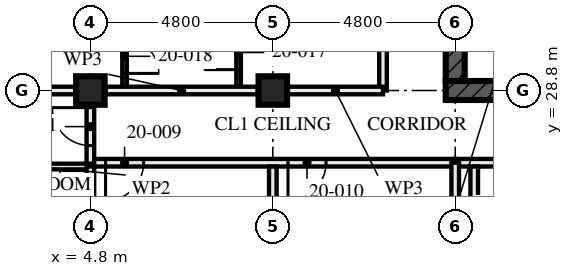
"""IFC4 building model, lengths in metres.
Left out: names, types, materials, properties, quantities, classifications, styles, units other than length and angle.
Written with IfcOpenShell. Run it as: python <this file> out.ifc"""

import sys

from ifc_helpers import new_model, si_unit, direction, frame, frame_2d, origin, origin_2d, place, context, subcontext, project, spatial, rectangle, hollow_rectangle, extrude, element, fill, save


model = new_model("IFC4")
c1 = context("Model", 3, precision=1e-05, world=origin(), true_north=direction((0.0, 1.0)))
c2 = subcontext(c1, "Body", "Model", "MODEL_VIEW")
j1 = project(units=[si_unit("LENGTHUNIT", "METRE"), si_unit("PLANEANGLEUNIT", "RADIAN")], contexts=[c1])
p1 = place(None, origin())
s1 = spatial("IfcSite", under=j1, at=p1, CompositionType="ELEMENT")
p2 = place(p1, origin())
s2 = spatial("IfcBuilding", under=s1, at=p2, CompositionType="ELEMENT")
p3 = place(p2, frame((0.0, 0.0, 76.0)))
s3 = spatial("IfcBuildingStorey", under=s2, at=p3, CompositionType="ELEMENT", Elevation=76.0)
for number, where, z_axis, x_axis in (
    (1, (4.8, 28.8, 0.0), (0.0, 0.0, 1.0), (0.0, 1.0, 0.0)),
    (2, (9.6, 28.8, 0.0), (0.0, 0.0, 1.0), (0.0, 1.0, 0.0)),
):
    element("IfcColumn", number, at=place(p3, frame(where, z_axis=z_axis, x_axis=x_axis)), inside=s3, PredefinedType="COLUMN", context=c2, shape_type="SweptSolid", body=[
        extrude(hollow_rectangle(XDim=0.75, YDim=0.75, WallThickness=0.08, at=origin_2d()), origin(), (0.0, 0.0, 1.0), 3.5),
    ])
p4 = place(p3, frame((14.15, 28.8, -0.17), z_axis=(0.0, 0.0, 1.0), x_axis=(1.0, 0.0, 0.0)))
e3 = element("IfcWall", 3, at=p4, inside=s3, PredefinedType="SHEAR", context=c2, shape_type="SweptSolid", body=[
    extrude(rectangle(XDim=14.9, YDim=0.5, at=frame_2d((7.45, 0.0))), origin(), (0.0, 0.0, 1.0), 3.42),
])
p5 = place(p4, frame((6.85, 0.0, 0.17)))
e4 = element("IfcOpeningElement", 4, at=p5, cuts=e3, PredefinedType="OPENING", context=c2, shape_type="SweptSolid", body=[
    extrude(rectangle(XDim=1.2, YDim=2.1, at=frame_2d((0.6, 1.05))), frame((0.0, 0.26, 0.0), z_axis=(0.0, -1.0, 0.0), x_axis=(1.0, 0.0, 0.0)), (0.0, 0.0, 1.0), 0.521),
])
p6 = place(p3, frame((14.4, 42.95, -0.17), z_axis=(0.0, 0.0, 1.0), x_axis=(0.0, -1.0, 0.0)))
e5 = element("IfcWall", 5, at=p6, inside=s3, PredefinedType="SHEAR", context=c2, shape_type="SweptSolid", body=[
    extrude(rectangle(XDim=13.9, YDim=0.5, at=frame_2d((6.95, 0.0))), origin(), (0.0, 0.0, 1.0), 3.42),
])
p7 = place(p6, frame((6.35, 0.0, 0.17)))
e6 = element("IfcOpeningElement", 6, at=p7, cuts=e5, PredefinedType="OPENING", context=c2, shape_type="SweptSolid", body=[
    extrude(rectangle(XDim=1.2, YDim=2.1, at=frame_2d((0.6, 1.05))), frame((0.0, 0.26, 0.0), z_axis=(0.0, -1.0, 0.0), x_axis=(1.0, 0.0, 0.0)), (0.0, 0.0, 1.0), 0.521),
])
p8 = place(p3, frame((2.0, 26.8, 0.0), z_axis=(0.0, 0.0, 1.0), x_axis=(1.0, 0.0, 0.0)))
e7 = element("IfcWall", 7, at=p8, inside=s3, PredefinedType="PARTITIONING", context=c2, shape_type="SweptSolid", body=[
    extrude(rectangle(XDim=2.8, YDim=0.15, at=frame_2d((1.4, 0.0))), origin(), (0.0, 0.0, 1.0), 3.25),
])
p9 = place(p3, frame((4.8, 19.52, 0.0), z_axis=(0.0, 0.0, 1.0), x_axis=(0.0, 1.0, 0.0)))
e8 = element("IfcWall", 8, at=p9, inside=s3, PredefinedType="PARTITIONING", context=c2, shape_type="SweptSolid", body=[
    extrude(rectangle(XDim=7.28, YDim=0.2, at=frame_2d((3.64, 0.0))), origin(), (0.0, 0.0, 1.0), 2.04),
])
p10 = place(p3, frame((9.6, 14.72, 0.0), z_axis=(0.0, 0.0, 1.0), x_axis=(0.0, 1.0, 0.0)))
e9 = element("IfcWall", 9, at=p10, inside=s3, PredefinedType="PARTITIONING", context=c2, shape_type="SweptSolid", body=[
    extrude(rectangle(XDim=12.08, YDim=0.2, at=frame_2d((6.04, 0.0))), origin(), (0.0, 0.0, 1.0), 2.04),
])
p11 = place(p3, frame((4.8, 26.9, 0.0), z_axis=(0.0, 0.0, 1.0), x_axis=(1.0, 0.0, 0.0)))
e10 = element("IfcWall", 10, at=p11, inside=s3, PredefinedType="PARTITIONING", context=c2, shape_type="SweptSolid", body=[
    extrude(rectangle(XDim=9.6, YDim=0.2, at=frame_2d((4.8, 0.0))), origin(), (0.0, 0.0, 1.0), 3.25),
])
p12 = place(p11, frame((0.4, 0.0, 0.0)))
e11 = element("IfcOpeningElement", 11, at=p12, cuts=e10, PredefinedType="OPENING", context=c2, shape_type="SweptSolid", body=[
    extrude(rectangle(XDim=1.0, YDim=2.1, at=frame_2d((0.5, 1.05))), frame((0.0, 0.111, 0.0), z_axis=(0.0, -1.0, 0.0), x_axis=(1.0, 0.0, 0.0)), (0.0, 0.0, 1.0), 0.221),
])
p13 = place(p11, frame((5.2, 0.0, 0.0)))
e12 = element("IfcOpeningElement", 12, at=p13, cuts=e10, PredefinedType="OPENING", context=c2, shape_type="SweptSolid", body=[
    extrude(rectangle(XDim=1.0, YDim=2.1, at=frame_2d((0.5, 1.05))), frame((0.0, 0.111, 0.0), z_axis=(0.0, -1.0, 0.0), x_axis=(1.0, 0.0, 0.0)), (0.0, 0.0, 1.0), 0.221),
])
p14 = place(p3, frame((4.8, 26.8, 0.0), z_axis=(0.0, 0.0, 1.0), x_axis=(0.0, 1.0, 0.0)))
e13 = element("IfcWall", 13, at=p14, inside=s3, PredefinedType="PARTITIONING", context=c2, shape_type="SweptSolid", body=[
    extrude(rectangle(XDim=1.605, YDim=0.2, at=frame_2d((0.802, 0.0))), origin(), (0.0, 0.0, 1.0), 3.25),
])
p15 = place(p14, frame((0.55, 0.0, 0.0)))
e14 = element("IfcOpeningElement", 14, at=p15, cuts=e13, PredefinedType="OPENING", context=c2, shape_type="SweptSolid", body=[
    extrude(rectangle(XDim=1.0, YDim=2.1, at=frame_2d((0.5, 1.05))), frame((0.0, 0.111, 0.0), z_axis=(0.0, -1.0, 0.0), x_axis=(1.0, 0.0, 0.0)), (0.0, 0.0, 1.0), 0.221),
])
p16 = place(p3, frame((8.7, 30.8, 0.0), z_axis=(0.0, 0.0, 1.0), x_axis=(0.0, -1.0, 0.0)))
e15 = element("IfcWall", 15, at=p16, inside=s3, PredefinedType="PARTITIONING", context=c2, shape_type="SweptSolid", body=[
    extrude(rectangle(XDim=2.0, YDim=0.12, at=frame_2d((1.0, 0.0))), origin(), (0.0, 0.0, 1.0), 3.25),
])
p17 = place(p16, frame((0.55, 0.0, 0.0)))
e16 = element("IfcOpeningElement", 16, at=p17, cuts=e15, PredefinedType="OPENING", context=c2, shape_type="SweptSolid", body=[
    extrude(rectangle(XDim=0.9, YDim=2.1, at=frame_2d((0.45, 1.05))), frame((0.0, 0.071, 0.0), z_axis=(0.0, -1.0, 0.0), x_axis=(1.0, 0.0, 0.0)), (0.0, 0.0, 1.0), 0.141),
])
p18 = place(p3, frame((5.7, 33.6, 0.0), z_axis=(0.0, 0.0, 1.0), x_axis=(0.0, -1.0, 0.0)))
e17 = element("IfcWall", 17, at=p18, inside=s3, PredefinedType="PARTITIONING", context=c2, shape_type="SweptSolid", body=[
    extrude(rectangle(XDim=4.8, YDim=0.12, at=frame_2d((2.4, 0.0))), origin(), (0.0, 0.0, 1.0), 3.25),
])
p19 = place(p18, frame((3.45, 0.0, 0.0)))
e18 = element("IfcOpeningElement", 18, at=p19, cuts=e17, PredefinedType="OPENING", context=c2, shape_type="SweptSolid", body=[
    extrude(rectangle(XDim=0.9, YDim=2.1, at=frame_2d((0.45, 1.05))), frame((0.0, 0.071, 0.0), z_axis=(0.0, -1.0, 0.0), x_axis=(1.0, 0.0, 0.0)), (0.0, 0.0, 1.0), 0.141),
])
p20 = place(p3, frame((12.5, 43.2, 0.0), z_axis=(0.0, 0.0, 1.0), x_axis=(0.0, -1.0, 0.0)))
e19 = element("IfcWall", 19, at=p20, inside=s3, PredefinedType="PARTITIONING", context=c2, shape_type="SweptSolid", body=[
    extrude(rectangle(XDim=14.4, YDim=0.2, at=frame_2d((7.2, 0.0))), origin(), (0.0, 0.0, 1.0), 2.04),
])
p21 = place(p20, frame((1.4, 0.0, 0.0)))
e20 = element("IfcOpeningElement", 20, at=p21, cuts=e19, PredefinedType="OPENING", context=c2, shape_type="SweptSolid", body=[
    extrude(rectangle(XDim=1.0, YDim=2.0, at=frame_2d((0.5, 1.0))), frame((0.0, 0.111, 0.0), z_axis=(0.0, -1.0, 0.0), x_axis=(1.0, 0.0, 0.0)), (0.0, 0.0, 1.0), 0.221),
])
p22 = place(p20, frame((5.2, 0.0, 0.0)))
e21 = element("IfcOpeningElement", 21, at=p22, cuts=e19, PredefinedType="OPENING", context=c2, shape_type="SweptSolid", body=[
    extrude(rectangle(XDim=1.0, YDim=2.0, at=frame_2d((0.5, 1.0))), frame((0.0, 0.111, 0.0), z_axis=(0.0, -1.0, 0.0), x_axis=(1.0, 0.0, 0.0)), (0.0, 0.0, 1.0), 0.221),
])
p23 = place(p20, frame((10.0, 0.0, 0.0)))
e22 = element("IfcOpeningElement", 22, at=p23, cuts=e19, PredefinedType="OPENING", context=c2, shape_type="SweptSolid", body=[
    extrude(rectangle(XDim=1.0, YDim=2.0, at=frame_2d((0.5, 1.0))), frame((0.0, 0.111, 0.0), z_axis=(0.0, -1.0, 0.0), x_axis=(1.0, 0.0, 0.0)), (0.0, 0.0, 1.0), 0.221),
])
p24 = place(p3, frame((14.9, 22.1, 0.0), z_axis=(0.0, 0.0, 1.0), x_axis=(0.0, 1.0, 0.0)))
e23 = element("IfcWall", 23, at=p24, inside=s3, PredefinedType="SOLIDWALL", context=c2, shape_type="SweptSolid", body=[
    extrude(rectangle(XDim=4.7, YDim=0.2, at=frame_2d((2.35, 0.0))), origin(), (0.0, 0.0, 1.0), 2.94),
])
p25 = place(p3, frame((14.4, 26.9, 0.0), z_axis=(0.0, 0.0, 1.0), x_axis=(1.0, 0.0, 0.0)))
e24 = element("IfcWall", 24, at=p25, inside=s3, PredefinedType="PARTITIONING", context=c2, shape_type="SweptSolid", body=[
    extrude(rectangle(XDim=14.4, YDim=0.2, at=frame_2d((7.2, 0.0))), origin(), (0.0, 0.0, 1.0), 2.04),
])
p26 = place(p25, frame((1.4, 0.0, 0.0)))
e25 = element("IfcOpeningElement", 25, at=p26, cuts=e24, PredefinedType="OPENING", context=c2, shape_type="SweptSolid", body=[
    extrude(rectangle(XDim=1.0, YDim=2.0, at=frame_2d((0.5, 1.0))), frame((0.0, 0.111, 0.0), z_axis=(0.0, -1.0, 0.0), x_axis=(1.0, 0.0, 0.0)), (0.0, 0.0, 1.0), 0.221),
])
p27 = place(p25, frame((3.65, 0.0, 0.0)))
e26 = element("IfcOpeningElement", 26, at=p27, cuts=e24, PredefinedType="OPENING", context=c2, shape_type="SweptSolid", body=[
    extrude(rectangle(XDim=0.9, YDim=2.0, at=frame_2d((0.45, 1.0))), frame((0.0, 0.111, 0.0), z_axis=(0.0, -1.0, 0.0), x_axis=(1.0, 0.0, 0.0)), (0.0, 0.0, 1.0), 0.221),
])
p28 = place(p25, frame((5.2, 0.0, 0.0)))
e27 = element("IfcOpeningElement", 27, at=p28, cuts=e24, PredefinedType="OPENING", context=c2, shape_type="SweptSolid", body=[
    extrude(rectangle(XDim=1.0, YDim=2.0, at=frame_2d((0.5, 1.0))), frame((0.0, 0.111, 0.0), z_axis=(0.0, -1.0, 0.0), x_axis=(1.0, 0.0, 0.0)), (0.0, 0.0, 1.0), 0.221),
])
p29 = place(p25, frame((10.0, 0.0, 0.0)))
e28 = element("IfcOpeningElement", 28, at=p29, cuts=e24, PredefinedType="OPENING", context=c2, shape_type="SweptSolid", body=[
    extrude(rectangle(XDim=1.0, YDim=2.0, at=frame_2d((0.5, 1.0))), frame((0.0, 0.111, 0.0), z_axis=(0.0, -1.0, 0.0), x_axis=(1.0, 0.0, 0.0)), (0.0, 0.0, 1.0), 0.221),
])
p30 = place(p3, frame((12.5, 28.8, 0.0), z_axis=(0.0, 0.0, 1.0), x_axis=(-1.0, 0.0, 0.0)))
e29 = element("IfcWall", 29, at=p30, inside=s3, PredefinedType="PARTITIONING", context=c2, shape_type="SweptSolid", body=[
    extrude(rectangle(XDim=2.505, YDim=0.2, at=frame_2d((1.252, 0.0))), origin(), (0.0, 0.0, 1.0), 2.04),
])
p31 = place(p3, frame((9.205, 28.8, 0.0), z_axis=(0.0, 0.0, 1.0), x_axis=(-1.0, 0.0, 0.0)))
e30 = element("IfcWall", 30, at=p31, inside=s3, PredefinedType="PARTITIONING", context=c2, shape_type="SweptSolid", body=[
    extrude(rectangle(XDim=4.01, YDim=0.2, at=frame_2d((2.005, 0.0))), origin(), (0.0, 0.0, 1.0), 2.04),
])
p32 = place(p3, frame((4.405, 28.8, 0.0), z_axis=(0.0, 0.0, 1.0), x_axis=(-1.0, 0.0, 0.0)))
e31 = element("IfcWall", 31, at=p32, inside=s3, PredefinedType="PARTITIONING", context=c2, shape_type="SweptSolid", body=[
    extrude(rectangle(XDim=4.085, YDim=0.2, at=frame_2d((2.042, 0.0))), origin(), (0.0, 0.0, 1.0), 2.04),
])
p33 = place(p3, frame((14.4, 24.395, 0.0), z_axis=(0.0, 0.0, 1.0), x_axis=(0.0, 1.0, 0.0)))
e32 = element("IfcWall", 32, at=p33, inside=s3, PredefinedType="PARTITIONING", context=c2, shape_type="SweptSolid", body=[
    extrude(rectangle(XDim=2.505, YDim=0.2, at=frame_2d((1.252, 0.0))), origin(), (0.0, 0.0, 1.0), 2.04),
])
p34 = place(p12, frame((1.0, 0.0, 0.0), z_axis=(0.0, 0.0, 1.0), x_axis=(-1.0, 0.0, 0.0)))
e33 = element("IfcDoor", 33, at=p34, inside=s3, OperationType="SINGLE_SWING_LEFT", PredefinedType="DOOR", context=c2, shape_type="SweptSolid", body=[
    extrude(rectangle(XDim=1.0, YDim=2.1, at=frame_2d((0.5, 1.05))), frame((0.0, 0.027, 0.0), z_axis=(0.0, -1.0, 0.0), x_axis=(1.0, 0.0, 0.0)), (0.0, 0.0, 1.0), 0.054),
])
fill(e11, e33)
p35 = place(p13, frame((1.0, 0.0, 0.0), z_axis=(0.0, 0.0, 1.0), x_axis=(-1.0, 0.0, 0.0)))
e34 = element("IfcDoor", 34, at=p35, inside=s3, OperationType="SINGLE_SWING_LEFT", PredefinedType="DOOR", context=c2, shape_type="SweptSolid", body=[
    extrude(rectangle(XDim=1.0, YDim=2.1, at=frame_2d((0.5, 1.05))), frame((0.0, 0.027, 0.0), z_axis=(0.0, -1.0, 0.0), x_axis=(1.0, 0.0, 0.0)), (0.0, 0.0, 1.0), 0.054),
])
fill(e12, e34)
p36 = place(p15, origin())
e35 = element("IfcDoor", 35, at=p36, inside=s3, OperationType="SINGLE_SWING_LEFT", PredefinedType="DOOR", context=c2, shape_type="SweptSolid", body=[
    extrude(rectangle(XDim=1.0, YDim=2.1, at=frame_2d((0.5, 1.05))), frame((0.0, 0.027, 0.0), z_axis=(0.0, -1.0, 0.0), x_axis=(1.0, 0.0, 0.0)), (0.0, 0.0, 1.0), 0.054),
])
fill(e14, e35)
p37 = place(p17, frame((0.9, 0.0, 0.0), z_axis=(0.0, 0.0, 1.0), x_axis=(-1.0, 0.0, 0.0)))
e36 = element("IfcDoor", 36, at=p37, inside=s3, OperationType="SINGLE_SWING_RIGHT", PredefinedType="DOOR", context=c2, shape_type="SweptSolid", body=[
    extrude(rectangle(XDim=0.9, YDim=2.1, at=frame_2d((0.45, 1.05))), frame((0.0, 0.022, 0.0), z_axis=(0.0, -1.0, 0.0), x_axis=(1.0, 0.0, 0.0)), (0.0, 0.0, 1.0), 0.044),
])
fill(e16, e36)
p38 = place(p19, origin())
e37 = element("IfcDoor", 37, at=p38, inside=s3, OperationType="SINGLE_SWING_LEFT", PredefinedType="DOOR", context=c2, shape_type="SweptSolid", body=[
    extrude(rectangle(XDim=0.9, YDim=2.1, at=frame_2d((0.45, 1.05))), frame((0.0, 0.022, 0.0), z_axis=(0.0, -1.0, 0.0), x_axis=(1.0, 0.0, 0.0)), (0.0, 0.0, 1.0), 0.044),
])
fill(e18, e37)
save(model, sys.argv[1])
